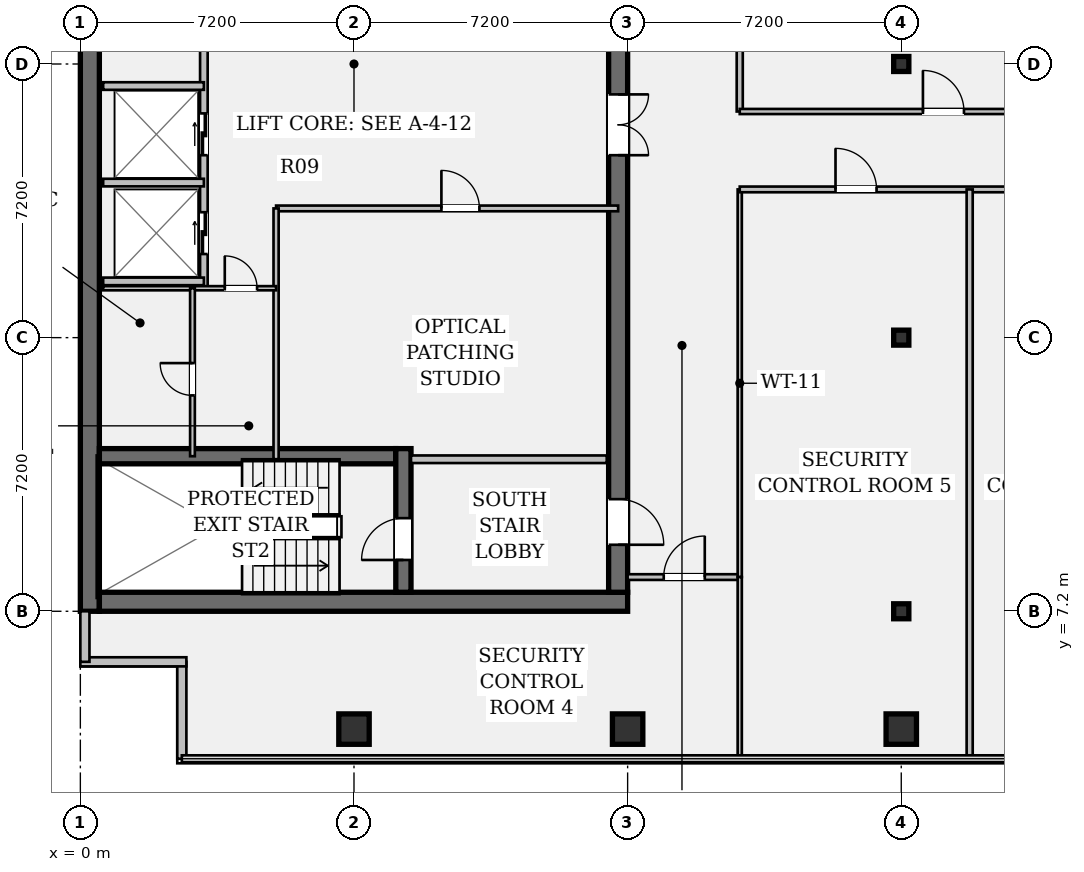
"""IFC4 building model, lengths in metres.
Left out: names, types, materials, properties, quantities, classifications, styles, units other than length and angle.
Written with IfcOpenShell. Run it as: python <this file> out.ifc"""

import sys

from ifc_helpers import new_model, si_unit, direction, frame, frame_2d, origin, origin_2d, place, context, subcontext, project, spatial, rectangle, hollow_rectangle, i_section, extrude, element, fill, save


model = new_model("IFC4")
c1 = context("Model", 3, precision=1e-05, world=origin(), true_north=direction((0.0, 1.0)))
c2 = subcontext(c1, "Body", "Model", "MODEL_VIEW")
j1 = project(units=[si_unit("LENGTHUNIT", "METRE"), si_unit("PLANEANGLEUNIT", "RADIAN")], contexts=[c1])
p1 = place(None, origin())
s1 = spatial("IfcSite", under=j1, at=p1, CompositionType="ELEMENT")
p2 = place(p1, origin())
s2 = spatial("IfcBuilding", under=s1, at=p2, CompositionType="ELEMENT")
p3 = place(p2, frame((0.0, 0.0, 194.25)))
s3 = spatial("IfcBuildingStorey", under=s2, at=p3, CompositionType="ELEMENT", Elevation=194.25)
p4 = place(p3, frame((0.25, 7.2, 0.0), z_axis=(0.0, 0.0, 1.0), x_axis=(0.0, 1.0, 0.0)))
e1 = element("IfcWall", 1, at=p4, inside=s3, PredefinedType="SHEAR", context=c2, shape_type="SweptSolid", body=[
    extrude(rectangle(XDim=28.8, YDim=0.5, at=frame_2d((14.4, 0.0))), origin(), (0.0, 0.0, 1.0), 3.24),
])
p5 = place(p3, frame((0.5, 7.45, 0.0), z_axis=(0.0, 0.0, 1.0), x_axis=(1.0, 0.0, 0.0)))
e2 = element("IfcWall", 2, at=p5, inside=s3, PredefinedType="SHEAR", context=c2, shape_type="SweptSolid", body=[
    extrude(rectangle(XDim=13.9, YDim=0.5, at=frame_2d((6.95, 0.0))), origin(), (0.0, 0.0, 1.0), 3.24),
])
p6 = place(p3, frame((14.15, 35.5, 0.0), z_axis=(0.0, 0.0, 1.0), x_axis=(0.0, -1.0, 0.0)))
e3 = element("IfcWall", 3, at=p6, inside=s3, PredefinedType="SHEAR", context=c2, shape_type="SweptSolid", body=[
    extrude(rectangle(XDim=27.8, YDim=0.5, at=frame_2d((13.9, 0.0))), origin(), (0.0, 0.0, 1.0), 3.24),
])
p7 = place(p6, frame((1.4, 0.0, 0.0)))
e4 = element("IfcOpeningElement", 4, at=p7, cuts=e3, PredefinedType="OPENING", context=c2, shape_type="SweptSolid", body=[
    extrude(rectangle(XDim=1.2, YDim=2.15, at=frame_2d((0.6, 1.075))), frame((0.0, 0.262, 0.0), z_axis=(0.0, -1.0, 0.0), x_axis=(1.0, 0.0, 0.0)), (0.0, 0.0, 1.0), 0.524),
])
p8 = place(p6, frame((25.35, 0.0, 0.0)))
e5 = element("IfcOpeningElement", 5, at=p8, cuts=e3, PredefinedType="OPENING", context=c2, shape_type="SweptSolid", body=[
    extrude(rectangle(XDim=1.2, YDim=2.15, at=frame_2d((0.6, 1.075))), frame((0.0, 0.262, 0.0), z_axis=(0.0, -1.0, 0.0), x_axis=(1.0, 0.0, 0.0)), (0.0, 0.0, 1.0), 0.524),
])
p9 = place(p6, frame((14.7, 0.0, 0.0)))
e6 = element("IfcOpeningElement", 6, at=p9, cuts=e3, PredefinedType="OPENING", context=c2, shape_type="SweptSolid", body=[
    extrude(rectangle(XDim=1.6, YDim=2.2, at=frame_2d((0.8, 1.1))), frame((0.0, 0.262, 0.0), z_axis=(0.0, -1.0, 0.0), x_axis=(1.0, 0.0, 0.0)), (0.0, 0.0, 1.0), 0.524),
])
p10 = place(p3, frame((0.5, 11.28, 0.0), z_axis=(0.0, 0.0, 1.0), x_axis=(1.0, 0.0, 0.0)))
e7 = element("IfcWall", 7, at=p10, inside=s3, PredefinedType="SHEAR", context=c2, shape_type="SweptSolid", body=[
    extrude(rectangle(XDim=7.8, YDim=0.4, at=frame_2d((3.9, 0.0))), origin(), (0.0, 0.0, 1.0), 3.24),
])
p11 = place(p3, frame((8.5, 7.7, 0.0), z_axis=(0.0, 0.0, 1.0), x_axis=(0.0, 1.0, 0.0)))
e8 = element("IfcWall", 8, at=p11, inside=s3, PredefinedType="SHEAR", context=c2, shape_type="SweptSolid", body=[
    extrude(rectangle(XDim=3.78, YDim=0.4, at=frame_2d((1.89, 0.0))), origin(), (0.0, 0.0, 1.0), 3.24),
])
p12 = place(p11, frame((0.85, 0.0, 0.0)))
e9 = element("IfcOpeningElement", 9, at=p12, cuts=e8, PredefinedType="OPENING", context=c2, shape_type="SweptSolid", body=[
    extrude(rectangle(XDim=1.1, YDim=2.15, at=frame_2d((0.55, 1.075))), frame((0.0, 0.212, 0.0), z_axis=(0.0, -1.0, 0.0), x_axis=(1.0, 0.0, 0.0)), (0.0, 0.0, 1.0), 0.424),
])
for number, where, z_axis, x_axis in (
    (10, (7.2, 4.1, 0.0), (0.0, 0.0, 1.0), (1.0, 0.0, 0.0)),
    (11, (14.4, 4.1, 0.0), (0.0, 0.0, 1.0), (1.0, 0.0, 0.0)),
    (12, (21.6, 4.1, 0.0), (0.0, 0.0, 1.0), (1.0, 0.0, 0.0)),
):
    element("IfcColumn", number, at=place(p3, frame(where, z_axis=z_axis, x_axis=x_axis)), inside=s3, PredefinedType="COLUMN", context=c2, shape_type="SweptSolid", body=[
        extrude(hollow_rectangle(XDim=0.8, YDim=0.8, WallThickness=0.05, at=origin_2d()), origin(), (0.0, 0.0, 1.0), 3.24),
    ])
for number, where, z_axis, x_axis in (
    (13, (21.6, 7.2, 0.0), (0.0, 0.0, 1.0), (1.0, 0.0, 0.0)),
    (14, (21.6, 14.4, 0.0), (0.0, 0.0, 1.0), (1.0, 0.0, 0.0)),
    (15, (21.6, 21.6, 0.0), (0.0, 0.0, 1.0), (1.0, 0.0, 0.0)),
):
    element("IfcColumn", number, at=place(p3, frame(where, z_axis=z_axis, x_axis=x_axis)), inside=s3, PredefinedType="COLUMN", context=c2, shape_type="SweptSolid", body=[
        extrude(i_section(OverallWidth=0.399, OverallDepth=0.394, WebThickness=0.023, FlangeThickness=0.037, FilletRadius=0.018, at=origin_2d()), origin(), (0.0, 0.0, 1.0), 3.24),
    ])
p13 = place(p3, frame((2.67, 3.32, 0.0), z_axis=(0.0, 0.0, 1.0), x_axis=(0.0, 1.0, 0.0)))
e16 = element("IfcWall", 16, at=p13, inside=s3, PredefinedType="STANDARD", context=c2, shape_type="SweptSolid", body=[
    extrude(rectangle(XDim=2.55, YDim=0.24, at=frame_2d((1.275, 0.0))), origin(), (0.0, 0.0, 1.0), 3.24),
])
p14 = place(p3, frame((2.79, 5.87, 0.0), z_axis=(0.0, 0.0, 1.0), x_axis=(-1.0, 0.0, 0.0)))
e17 = element("IfcWall", 17, at=p14, inside=s3, PredefinedType="STANDARD", context=c2, shape_type="SweptSolid", body=[
    extrude(rectangle(XDim=2.79, YDim=0.24, at=frame_2d((1.395, 0.0))), origin(), (0.0, 0.0, 1.0), 3.24),
])
p15 = place(p3, frame((0.12, 5.87, 0.0), z_axis=(0.0, 0.0, 1.0), x_axis=(0.0, 1.0, 0.0)))
e18 = element("IfcWall", 18, at=p15, inside=s3, PredefinedType="STANDARD", context=c2, shape_type="SweptSolid", body=[
    extrude(rectangle(XDim=1.33, YDim=0.24, at=frame_2d((0.665, 0.0))), origin(), (0.0, 0.0, 1.0), 3.24),
])
p16 = place(p3, frame((8.7, 11.2, 0.0), z_axis=(0.0, 0.0, 1.0), x_axis=(1.0, 0.0, 0.0)))
e19 = element("IfcWall", 19, at=p16, inside=s3, PredefinedType="PARTITIONING", context=c2, shape_type="SweptSolid", body=[
    extrude(rectangle(XDim=5.15, YDim=0.2, at=frame_2d((2.575, 0.0))), origin(), (0.0, 0.0, 1.0), 3.24),
])
p17 = place(p3, frame((3.25, 15.7, 0.0), z_axis=(0.0, 0.0, 1.0), x_axis=(0.0, 1.0, 0.0)))
e20 = element("IfcWall", 20, at=p17, inside=s3, PredefinedType="PARTITIONING", context=c2, shape_type="SweptSolid", body=[
    extrude(rectangle(XDim=13.08, YDim=0.2, at=frame_2d((6.54, 0.0))), origin(), (0.0, 0.0, 1.0), 3.24),
])
p18 = place(p17, frame((0.9, 0.0, 0.0)))
e21 = element("IfcOpeningElement", 21, at=p18, cuts=e20, PredefinedType="OPENING", context=c2, shape_type="SweptSolid", body=[
    extrude(rectangle(XDim=1.1, YDim=2.2, at=frame_2d((0.55, 1.1))), frame((0.0, 0.112, 0.0), z_axis=(0.0, -1.0, 0.0), x_axis=(1.0, 0.0, 0.0)), (0.0, 0.0, 1.0), 0.224),
])
p19 = place(p17, frame((3.5, 0.0, 0.0)))
e22 = element("IfcOpeningElement", 22, at=p19, cuts=e20, PredefinedType="OPENING", context=c2, shape_type="SweptSolid", body=[
    extrude(rectangle(XDim=1.1, YDim=2.2, at=frame_2d((0.55, 1.1))), frame((0.0, 0.112, 0.0), z_axis=(0.0, -1.0, 0.0), x_axis=(1.0, 0.0, 0.0)), (0.0, 0.0, 1.0), 0.224),
])
p20 = place(p17, frame((7.2, 0.0, 0.0)))
e23 = element("IfcOpeningElement", 23, at=p20, cuts=e20, PredefinedType="OPENING", context=c2, shape_type="SweptSolid", body=[
    extrude(rectangle(XDim=1.1, YDim=2.2, at=frame_2d((0.55, 1.1))), frame((0.0, 0.112, 0.0), z_axis=(0.0, -1.0, 0.0), x_axis=(1.0, 0.0, 0.0)), (0.0, 0.0, 1.0), 0.224),
])
p21 = place(p17, frame((9.8, 0.0, 0.0)))
e24 = element("IfcOpeningElement", 24, at=p21, cuts=e20, PredefinedType="OPENING", context=c2, shape_type="SweptSolid", body=[
    extrude(rectangle(XDim=1.1, YDim=2.2, at=frame_2d((0.55, 1.1))), frame((0.0, 0.112, 0.0), z_axis=(0.0, -1.0, 0.0), x_axis=(1.0, 0.0, 0.0)), (0.0, 0.0, 1.0), 0.224),
])
for number, where, z_axis, x_axis in (
    (25, (0.6, 15.88, 0.0), (0.0, 0.0, 1.0), (1.0, 0.0, 0.0)),
    (26, (0.6, 18.48, 0.0), (0.0, 0.0, 1.0), (1.0, 0.0, 0.0)),
    (27, (0.6, 21.02, 0.0), (0.0, 0.0, 1.0), (1.0, 0.0, 0.0)),
):
    element("IfcWall", number, at=place(p3, frame(where, z_axis=z_axis, x_axis=x_axis)), inside=s3, PredefinedType="PARTITIONING", context=c2, shape_type="SweptSolid", body=[
        extrude(rectangle(XDim=2.65, YDim=0.2, at=frame_2d((1.325, 0.0))), origin(), (0.0, 0.0, 1.0), 3.24),
    ])
p22 = place(p3, frame((5.15, 17.8, 0.0), z_axis=(0.0, 0.0, 1.0), x_axis=(1.0, 0.0, 0.0)))
e28 = element("IfcWall", 28, at=p22, inside=s3, PredefinedType="PARTITIONING", context=c2, shape_type="SweptSolid", body=[
    extrude(rectangle(XDim=9.0, YDim=0.15, at=frame_2d((4.5, 0.0))), origin(), (0.0, 0.0, 1.0), 3.24),
])
p23 = place(p22, frame((4.35, 0.0, 0.0)))
e29 = element("IfcOpeningElement", 29, at=p23, cuts=e28, PredefinedType="OPENING", context=c2, shape_type="SweptSolid", body=[
    extrude(rectangle(XDim=1.0, YDim=2.15, at=frame_2d((0.5, 1.075))), frame((0.0, 0.087, 0.0), z_axis=(0.0, -1.0, 0.0), x_axis=(1.0, 0.0, 0.0)), (0.0, 0.0, 1.0), 0.174),
])
p24 = place(p3, frame((5.15, 11.2, 0.0), z_axis=(0.0, 0.0, 1.0), x_axis=(0.0, 1.0, 0.0)))
e30 = element("IfcWall", 30, at=p24, inside=s3, PredefinedType="PARTITIONING", context=c2, shape_type="SweptSolid", body=[
    extrude(rectangle(XDim=6.6, YDim=0.135, at=frame_2d((3.3, 0.0))), origin(), (0.0, 0.0, 1.0), 3.24),
])
p25 = place(p3, frame((0.6, 15.7, 0.0), z_axis=(0.0, 0.0, 1.0), x_axis=(1.0, 0.0, 0.0)))
e31 = element("IfcWall", 31, at=p25, inside=s3, PredefinedType="PARTITIONING", context=c2, shape_type="SweptSolid", body=[
    extrude(rectangle(XDim=4.55, YDim=0.11, at=frame_2d((2.275, 0.0))), origin(), (0.0, 0.0, 1.0), 3.24),
])
p26 = place(p25, frame((3.2, 0.0, 0.0)))
e32 = element("IfcOpeningElement", 32, at=p26, cuts=e31, PredefinedType="OPENING", context=c2, shape_type="SweptSolid", body=[
    extrude(rectangle(XDim=0.85, YDim=2.15, at=frame_2d((0.425, 1.075))), frame((0.0, 0.067, 0.0), z_axis=(0.0, -1.0, 0.0), x_axis=(1.0, 0.0, 0.0)), (0.0, 0.0, 1.0), 0.134),
])
p27 = place(p3, frame((2.95, 11.28, 0.0), z_axis=(0.0, 0.0, 1.0), x_axis=(0.0, 1.0, 0.0)))
e33 = element("IfcWall", 33, at=p27, inside=s3, PredefinedType="PARTITIONING", context=c2, shape_type="SweptSolid", body=[
    extrude(rectangle(XDim=4.42, YDim=0.125, at=frame_2d((2.21, 0.0))), origin(), (0.0, 0.0, 1.0), 3.24),
])
p28 = place(p27, frame((1.6, 0.0, 0.0)))
e34 = element("IfcOpeningElement", 34, at=p28, cuts=e33, PredefinedType="OPENING", context=c2, shape_type="SweptSolid", body=[
    extrude(rectangle(XDim=0.85, YDim=2.15, at=frame_2d((0.425, 1.075))), frame((0.0, 0.074, 0.0), z_axis=(0.0, -1.0, 0.0), x_axis=(1.0, 0.0, 0.0)), (0.0, 0.0, 1.0), 0.149),
])
p29 = place(p3, frame((14.4, 8.1, 0.0), z_axis=(0.0, 0.0, 1.0), x_axis=(1.0, 0.0, 0.0)))
e35 = element("IfcWall", 35, at=p29, inside=s3, PredefinedType="PARTITIONING", context=c2, shape_type="SweptSolid", body=[
    extrude(rectangle(XDim=2.95, YDim=0.15, at=frame_2d((1.475, 0.0))), origin(), (0.0, 0.0, 1.0), 2.808),
])
p30 = place(p29, frame((0.95, 0.0, 0.0)))
e36 = element("IfcOpeningElement", 36, at=p30, cuts=e35, PredefinedType="OPENING", context=c2, shape_type="SweptSolid", body=[
    extrude(rectangle(XDim=1.08, YDim=2.15, at=frame_2d((0.54, 1.075))), frame((0.0, 0.087, 0.0), z_axis=(0.0, -1.0, 0.0), x_axis=(1.0, 0.0, 0.0)), (0.0, 0.0, 1.0), 0.174),
])
p31 = place(p3, frame((17.35, 8.1, 0.0), z_axis=(0.0, 0.0, 1.0), x_axis=(0.0, 1.0, 0.0)))
e37 = element("IfcWall", 37, at=p31, inside=s3, PredefinedType="PARTITIONING", context=c2, shape_type="SweptSolid", body=[
    extrude(rectangle(XDim=10.2, YDim=0.11, at=frame_2d((5.1, 0.0))), origin(), (0.0, 0.0, 1.0), 2.603),
])
p32 = place(p3, frame((17.35, 20.35, 0.0), z_axis=(0.0, 0.0, 1.0), x_axis=(0.0, 1.0, 0.0)))
e38 = element("IfcWall", 38, at=p32, inside=s3, PredefinedType="PARTITIONING", context=c2, shape_type="SweptSolid", body=[
    extrude(rectangle(XDim=14.85, YDim=0.16, at=frame_2d((7.425, 0.0))), origin(), (0.0, 0.0, 1.0), 2.603),
])
p33 = place(p32, frame((3.84, 0.0, 0.0)))
e39 = element("IfcOpeningElement", 39, at=p33, cuts=e38, PredefinedType="OPENING", context=c2, shape_type="SweptSolid", body=[
    extrude(rectangle(XDim=0.9, YDim=2.15, at=frame_2d((0.45, 1.075))), frame((0.0, 0.092, 0.0), z_axis=(0.0, -1.0, 0.0), x_axis=(1.0, 0.0, 0.0)), (0.0, 0.0, 1.0), 0.184),
])
p34 = place(p32, frame((7.04, 0.0, 0.0)))
e40 = element("IfcOpeningElement", 40, at=p34, cuts=e38, PredefinedType="OPENING", context=c2, shape_type="SweptSolid", body=[
    extrude(rectangle(XDim=0.9, YDim=2.15, at=frame_2d((0.45, 1.075))), frame((0.0, 0.092, 0.0), z_axis=(0.0, -1.0, 0.0), x_axis=(1.0, 0.0, 0.0)), (0.0, 0.0, 1.0), 0.184),
])
p35 = place(p32, frame((10.22, 0.0, 0.0)))
e41 = element("IfcOpeningElement", 41, at=p35, cuts=e38, PredefinedType="OPENING", context=c2, shape_type="SweptSolid", body=[
    extrude(rectangle(XDim=0.9, YDim=2.15, at=frame_2d((0.45, 1.075))), frame((0.0, 0.092, 0.0), z_axis=(0.0, -1.0, 0.0), x_axis=(1.0, 0.0, 0.0)), (0.0, 0.0, 1.0), 0.184),
])
p36 = place(p32, frame((13.41, 0.0, 0.0)))
e42 = element("IfcOpeningElement", 42, at=p36, cuts=e38, PredefinedType="OPENING", context=c2, shape_type="SweptSolid", body=[
    extrude(rectangle(XDim=0.9, YDim=2.15, at=frame_2d((0.45, 1.075))), frame((0.0, 0.092, 0.0), z_axis=(0.0, -1.0, 0.0), x_axis=(1.0, 0.0, 0.0)), (0.0, 0.0, 1.0), 0.184),
])
p37 = place(p3, frame((17.35, 18.3, 0.0), z_axis=(0.0, 0.0, 1.0), x_axis=(1.0, 0.0, 0.0)))
e43 = element("IfcWall", 43, at=p37, inside=s3, PredefinedType="PARTITIONING", context=c2, shape_type="SweptSolid", body=[
    extrude(rectangle(XDim=16.2, YDim=0.15, at=frame_2d((8.1, 0.0))), origin(), (0.0, 0.0, 1.0), 2.603),
])
p38 = place(p37, frame((2.52, 0.0, 0.0)))
e44 = element("IfcOpeningElement", 44, at=p38, cuts=e43, PredefinedType="OPENING", context=c2, shape_type="SweptSolid", body=[
    extrude(rectangle(XDim=1.08, YDim=2.15, at=frame_2d((0.54, 1.075))), frame((0.0, 0.087, 0.0), z_axis=(0.0, -1.0, 0.0), x_axis=(1.0, 0.0, 0.0)), (0.0, 0.0, 1.0), 0.174),
])
p39 = place(p37, frame((8.55, 0.0, 0.0)))
e45 = element("IfcOpeningElement", 45, at=p39, cuts=e43, PredefinedType="OPENING", context=c2, shape_type="SweptSolid", body=[
    extrude(rectangle(XDim=1.08, YDim=2.15, at=frame_2d((0.54, 1.075))), frame((0.0, 0.087, 0.0), z_axis=(0.0, -1.0, 0.0), x_axis=(1.0, 0.0, 0.0)), (0.0, 0.0, 1.0), 0.174),
])
p40 = place(p37, frame((13.62, 0.0, 0.0)))
e46 = element("IfcOpeningElement", 46, at=p40, cuts=e43, PredefinedType="OPENING", context=c2, shape_type="SweptSolid", body=[
    extrude(rectangle(XDim=1.08, YDim=2.15, at=frame_2d((0.54, 1.075))), frame((0.0, 0.087, 0.0), z_axis=(0.0, -1.0, 0.0), x_axis=(1.0, 0.0, 0.0)), (0.0, 0.0, 1.0), 0.174),
])
p41 = place(p3, frame((17.35, 20.35, 0.0), z_axis=(0.0, 0.0, 1.0), x_axis=(1.0, 0.0, 0.0)))
e47 = element("IfcWall", 47, at=p41, inside=s3, PredefinedType="PARTITIONING", context=c2, shape_type="SweptSolid", body=[
    extrude(rectangle(XDim=16.2, YDim=0.135, at=frame_2d((8.1, 0.0))), origin(), (0.0, 0.0, 1.0), 2.603),
])
p42 = place(p41, frame((4.82, 0.0, 0.0)))
e48 = element("IfcOpeningElement", 48, at=p42, cuts=e47, PredefinedType="OPENING", context=c2, shape_type="SweptSolid", body=[
    extrude(rectangle(XDim=1.08, YDim=2.15, at=frame_2d((0.54, 1.075))), frame((0.0, 0.08, 0.0), z_axis=(0.0, -1.0, 0.0), x_axis=(1.0, 0.0, 0.0)), (0.0, 0.0, 1.0), 0.159),
])
p43 = place(p41, frame((12.28, 0.0, 0.0)))
e49 = element("IfcOpeningElement", 49, at=p43, cuts=e47, PredefinedType="OPENING", context=c2, shape_type="SweptSolid", body=[
    extrude(rectangle(XDim=1.08, YDim=2.15, at=frame_2d((0.54, 1.075))), frame((0.0, 0.08, 0.0), z_axis=(0.0, -1.0, 0.0), x_axis=(1.0, 0.0, 0.0)), (0.0, 0.0, 1.0), 0.159),
])
p44 = place(p3, frame((17.35, 3.32, 0.0), z_axis=(0.0, 0.0, 1.0), x_axis=(0.0, 1.0, 0.0)))
e50 = element("IfcWall", 50, at=p44, inside=s3, PredefinedType="PARTITIONING", context=c2, shape_type="SweptSolid", body=[
    extrude(rectangle(XDim=4.78, YDim=0.11, at=frame_2d((2.39, 0.0))), origin(), (0.0, 0.0, 1.0), 2.603),
])
p45 = place(p3, frame((23.4, 3.32, 0.0), z_axis=(0.0, 0.0, 1.0), x_axis=(0.0, 1.0, 0.0)))
e51 = element("IfcWall", 51, at=p45, inside=s3, PredefinedType="PARTITIONING", context=c2, shape_type="SweptSolid", body=[
    extrude(rectangle(XDim=14.98, YDim=0.16, at=frame_2d((7.49, 0.0))), origin(), (0.0, 0.0, 1.0), 2.603),
])
p46 = place(p12, origin())
e52 = element("IfcDoor", 52, at=p46, inside=s3, OperationType="SINGLE_SWING_LEFT", PredefinedType="DOOR", context=c2, shape_type="SweptSolid", body=[
    extrude(rectangle(XDim=1.1, YDim=2.15, at=frame_2d((0.55, 1.075))), frame((0.0, 0.025, 0.0), z_axis=(0.0, -1.0, 0.0), x_axis=(1.0, 0.0, 0.0)), (0.0, 0.0, 1.0), 0.05),
])
fill(e9, e52)
p47 = place(p8, origin())
e53 = element("IfcDoor", 53, at=p47, inside=s3, OperationType="SINGLE_SWING_RIGHT", PredefinedType="DOOR", context=c2, shape_type="SweptSolid", body=[
    extrude(rectangle(XDim=1.2, YDim=2.15, at=frame_2d((0.6, 1.075))), frame((0.0, 0.025, 0.0), z_axis=(0.0, -1.0, 0.0), x_axis=(1.0, 0.0, 0.0)), (0.0, 0.0, 1.0), 0.05),
])
fill(e5, e53)
p48 = place(p9, origin())
e54 = element("IfcDoor", 54, at=p48, inside=s3, OperationType="DOUBLE_DOOR_SINGLE_SWING", PredefinedType="DOOR", context=c2, shape_type="SweptSolid", body=[
    extrude(rectangle(XDim=1.6, YDim=2.2, at=frame_2d((0.8, 1.1))), frame((0.0, 0.025, 0.0), z_axis=(0.0, -1.0, 0.0), x_axis=(1.0, 0.0, 0.0)), (0.0, 0.0, 1.0), 0.05),
])
fill(e6, e54)
p49 = place(p18, origin())
e55 = element("IfcDoor", 55, at=p49, inside=s3, OperationType="DOUBLE_DOOR_SLIDING", PredefinedType="DOOR", context=c2, shape_type="SweptSolid", body=[
    extrude(rectangle(XDim=1.1, YDim=2.2, at=frame_2d((0.55, 1.1))), frame((0.0, 0.025, 0.0), z_axis=(0.0, -1.0, 0.0), x_axis=(1.0, 0.0, 0.0)), (0.0, 0.0, 1.0), 0.05),
])
fill(e21, e55)
p50 = place(p19, origin())
e56 = element("IfcDoor", 56, at=p50, inside=s3, OperationType="DOUBLE_DOOR_SLIDING", PredefinedType="DOOR", context=c2, shape_type="SweptSolid", body=[
    extrude(rectangle(XDim=1.1, YDim=2.2, at=frame_2d((0.55, 1.1))), frame((0.0, 0.025, 0.0), z_axis=(0.0, -1.0, 0.0), x_axis=(1.0, 0.0, 0.0)), (0.0, 0.0, 1.0), 0.05),
])
fill(e22, e56)
p51 = place(p23, origin())
e57 = element("IfcDoor", 57, at=p51, inside=s3, OperationType="SINGLE_SWING_LEFT", PredefinedType="DOOR", context=c2, shape_type="SweptSolid", body=[
    extrude(rectangle(XDim=1.0, YDim=2.15, at=frame_2d((0.5, 1.075))), frame((0.0, 0.025, 0.0), z_axis=(0.0, -1.0, 0.0), x_axis=(1.0, 0.0, 0.0)), (0.0, 0.0, 1.0), 0.05),
])
fill(e29, e57)
p52 = place(p26, origin())
e58 = element("IfcDoor", 58, at=p52, inside=s3, OperationType="SINGLE_SWING_LEFT", PredefinedType="DOOR", context=c2, shape_type="SweptSolid", body=[
    extrude(rectangle(XDim=0.85, YDim=2.15, at=frame_2d((0.425, 1.075))), frame((0.0, 0.025, 0.0), z_axis=(0.0, -1.0, 0.0), x_axis=(1.0, 0.0, 0.0)), (0.0, 0.0, 1.0), 0.05),
])
fill(e32, e58)
p53 = place(p28, origin())
e59 = element("IfcDoor", 59, at=p53, inside=s3, OperationType="SINGLE_SWING_RIGHT", PredefinedType="DOOR", context=c2, shape_type="SweptSolid", body=[
    extrude(rectangle(XDim=0.85, YDim=2.15, at=frame_2d((0.425, 1.075))), frame((0.0, 0.025, 0.0), z_axis=(0.0, -1.0, 0.0), x_axis=(1.0, 0.0, 0.0)), (0.0, 0.0, 1.0), 0.05),
])
fill(e34, e59)
p54 = place(p42, origin())
e60 = element("IfcDoor", 60, at=p54, inside=s3, OperationType="SINGLE_SWING_LEFT", PredefinedType="DOOR", context=c2, shape_type="SweptSolid", body=[
    extrude(rectangle(XDim=1.08, YDim=2.15, at=frame_2d((0.54, 1.075))), frame((0.0, 0.025, 0.0), z_axis=(0.0, -1.0, 0.0), x_axis=(1.0, 0.0, 0.0)), (0.0, 0.0, 1.0), 0.05),
])
fill(e48, e60)
p55 = place(p30, origin())
e61 = element("IfcDoor", 61, at=p55, inside=s3, OperationType="SINGLE_SWING_RIGHT", PredefinedType="DOOR", context=c2, shape_type="SweptSolid", body=[
    extrude(rectangle(XDim=1.08, YDim=2.15, at=frame_2d((0.54, 1.075))), frame((0.0, 0.025, 0.0), z_axis=(0.0, -1.0, 0.0), x_axis=(1.0, 0.0, 0.0)), (0.0, 0.0, 1.0), 0.05),
])
fill(e36, e61)
p56 = place(p38, origin())
e62 = element("IfcDoor", 62, at=p56, inside=s3, OperationType="SINGLE_SWING_LEFT", PredefinedType="DOOR", context=c2, shape_type="SweptSolid", body=[
    extrude(rectangle(XDim=1.08, YDim=2.15, at=frame_2d((0.54, 1.075))), frame((0.0, 0.025, 0.0), z_axis=(0.0, -1.0, 0.0), x_axis=(1.0, 0.0, 0.0)), (0.0, 0.0, 1.0), 0.05),
])
fill(e44, e62)
save(model, sys.argv[1])
